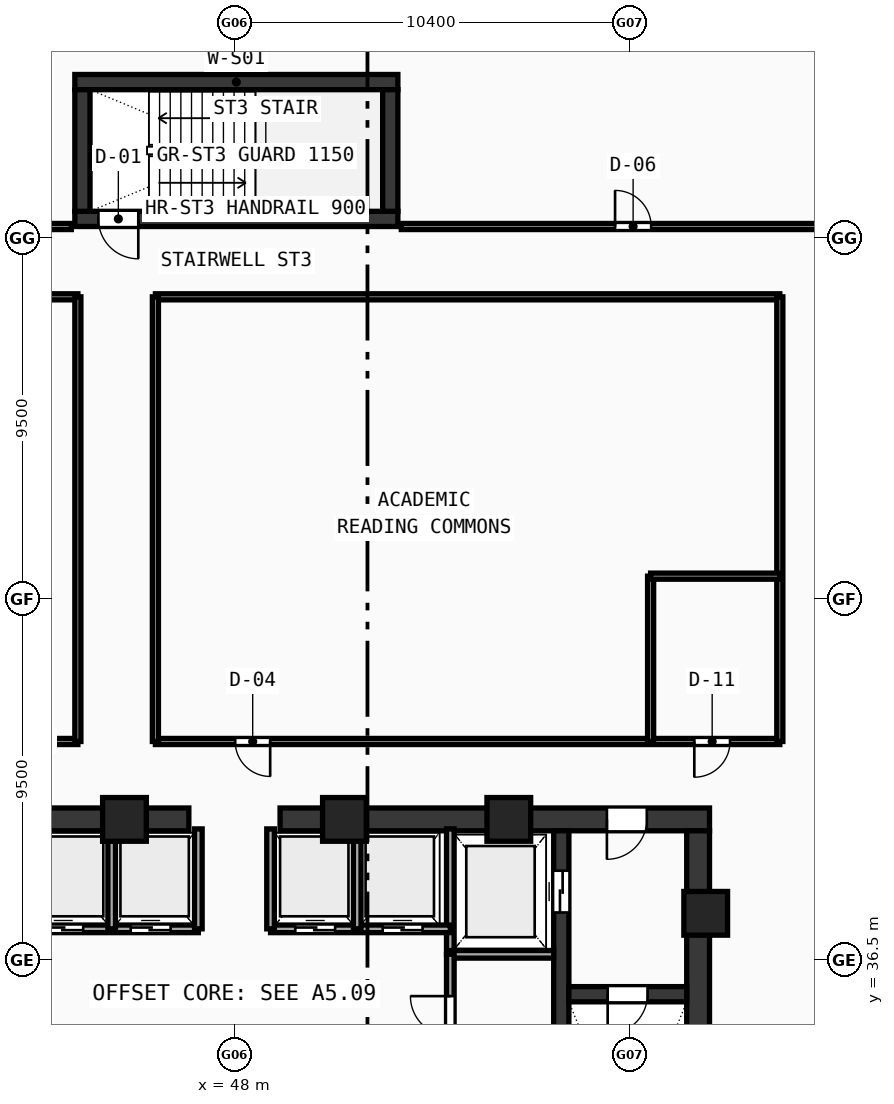
"""IFC4 building model, lengths in metres.
Left out: names, types, materials, properties, quantities, classifications, styles, units other than length and angle.
Written with IfcOpenShell. Run it as: python <this file> out.ifc"""

import sys

from ifc_helpers import new_model, si_unit, direction, frame, frame_2d, origin, origin_with_axes, origin_2d, place, context, subcontext, project, spatial, rectangle, hollow_rectangle, extrude, source, transform, mapped, element, fill, save


model = new_model("IFC4")
c1 = context("Model", 3, precision=1e-05, world=origin(), true_north=direction((0.0, 1.0)))
c2 = subcontext(c1, "Body", "Model", "MODEL_VIEW")
j1 = project(units=[si_unit("LENGTHUNIT", "METRE"), si_unit("PLANEANGLEUNIT", "RADIAN")], contexts=[c1])
p1 = place(None, origin())
s1 = spatial("IfcSite", under=j1, at=p1, CompositionType="ELEMENT")
p2 = place(p1, origin())
s2 = spatial("IfcBuilding", under=s1, at=p2, CompositionType="ELEMENT")
p3 = place(p2, frame((0.0, 0.0, 111.58)))
s3 = spatial("IfcBuildingStorey", under=s2, at=p3, CompositionType="ELEMENT", Elevation=111.58)
p4 = place(p3, frame((35.5, 40.2, 0.0), z_axis=(0.0, 0.0, 1.0), x_axis=(1.0, 0.0, 0.0)))
e1 = element("IfcWall", 1, at=p4, inside=s3, PredefinedType="SHEAR", context=c2, shape_type="SweptSolid", body=[
    extrude(rectangle(XDim=11.3, YDim=0.6, at=frame_2d((5.65, 0.0))), origin(), (0.0, 0.0, 1.0), 3.54),
])
p5 = place(p4, frame((1.65, 0.0, 0.0)))
e2 = element("IfcOpeningElement", 2, at=p5, cuts=e1, PredefinedType="OPENING", context=c2, shape_type="SweptSolid", body=[
    extrude(rectangle(XDim=1.05, YDim=2.1, at=frame_2d((0.525, 1.05))), frame((0.0, 0.31, 0.0), z_axis=(0.0, -1.0, 0.0), x_axis=(1.0, 0.0, 0.0)), (0.0, 0.0, 1.0), 0.62),
])
p6 = place(p3, frame((49.2, 40.2, 0.0), z_axis=(0.0, 0.0, 1.0), x_axis=(1.0, 0.0, 0.0)))
e3 = element("IfcWall", 3, at=p6, inside=s3, PredefinedType="SHEAR", context=c2, shape_type="SweptSolid", body=[
    extrude(rectangle(XDim=11.3, YDim=0.6, at=frame_2d((5.65, 0.0))), origin(), (0.0, 0.0, 1.0), 3.54),
])
p7 = place(p6, frame((8.6, 0.0, 0.0)))
e4 = element("IfcOpeningElement", 4, at=p7, cuts=e3, PredefinedType="OPENING", context=c2, shape_type="SweptSolid", body=[
    extrude(rectangle(XDim=1.05, YDim=2.1, at=frame_2d((0.525, 1.05))), frame((0.0, 0.31, 0.0), z_axis=(0.0, -1.0, 0.0), x_axis=(1.0, 0.0, 0.0)), (0.0, 0.0, 1.0), 0.62),
])
p8 = place(p3, frame((60.2, 27.8, 0.0), z_axis=(0.0, 0.0, 1.0), x_axis=(0.0, 1.0, 0.0)))
e5 = element("IfcWall", 5, at=p8, inside=s3, PredefinedType="SHEAR", context=c2, shape_type="SweptSolid", body=[
    extrude(rectangle(XDim=12.1, YDim=0.6, at=frame_2d((6.05, 0.0))), origin(), (0.0, 0.0, 1.0), 3.54),
])
p9 = place(p3, frame((56.6, 27.8, 0.0), z_axis=(0.0, 0.0, 1.0), x_axis=(0.0, 1.0, 0.0)))
e6 = element("IfcWall", 6, at=p9, inside=s3, PredefinedType="SHEAR", context=c2, shape_type="SweptSolid", body=[
    extrude(rectangle(XDim=12.1, YDim=0.4, at=frame_2d((6.05, 0.0))), origin(), (0.0, 0.0, 1.0), 3.54),
])
p10 = place(p9, frame((9.95, 0.0, 0.0)))
e7 = element("IfcOpeningElement", 7, at=p10, cuts=e6, PredefinedType="OPENING", context=c2, shape_type="SweptSolid", body=[
    extrude(rectangle(XDim=1.1, YDim=2.1, at=frame_2d((0.55, 1.05))), frame((0.0, 0.21, 0.0), z_axis=(0.0, -1.0, 0.0), x_axis=(1.0, 0.0, 0.0)), (0.0, 0.0, 1.0), 0.42),
])
p11 = place(p3, frame((56.8, 35.6, 0.0), z_axis=(0.0, 0.0, 1.0), x_axis=(1.0, 0.0, 0.0)))
e8 = element("IfcWall", 8, at=p11, inside=s3, PredefinedType="SHEAR", context=c2, shape_type="SweptSolid", body=[
    extrude(rectangle(XDim=3.1, YDim=0.4, at=frame_2d((1.55, 0.0))), origin(), (0.0, 0.0, 1.0), 3.54),
])
p12 = place(p11, frame((1.02, 0.0, 0.0)))
e9 = element("IfcOpeningElement", 9, at=p12, cuts=e8, PredefinedType="OPENING", context=c2, shape_type="SweptSolid", body=[
    extrude(rectangle(XDim=1.05, YDim=2.1, at=frame_2d((0.525, 1.05))), frame((0.0, 0.21, 0.0), z_axis=(0.0, -1.0, 0.0), x_axis=(1.0, 0.0, 0.0)), (0.0, 0.0, 1.0), 0.42),
])
p13 = place(p3, frame((43.8, 59.6, 0.0), z_axis=(0.0, 0.0, 1.0), x_axis=(1.0, 0.0, 0.0)))
e10 = element("IfcWall", 10, at=p13, inside=s3, PredefinedType="SHEAR", context=c2, shape_type="SweptSolid", body=[
    extrude(rectangle(XDim=8.5, YDim=0.4, at=frame_2d((4.25, 0.0))), origin(), (0.0, 0.0, 1.0), 3.54),
])
p14 = place(p3, frame((43.8, 56.0, 0.0), z_axis=(0.0, 0.0, 1.0), x_axis=(1.0, 0.0, 0.0)))
e11 = element("IfcWall", 11, at=p14, inside=s3, PredefinedType="SHEAR", context=c2, shape_type="SweptSolid", body=[
    extrude(rectangle(XDim=8.5, YDim=0.4, at=frame_2d((4.25, 0.0))), origin(), (0.0, 0.0, 1.0), 3.54),
])
p15 = place(p14, frame((0.62, 0.0, 0.0)))
e12 = element("IfcOpeningElement", 12, at=p15, cuts=e11, PredefinedType="OPENING", context=c2, shape_type="SweptSolid", body=[
    extrude(rectangle(XDim=1.05, YDim=2.1, at=frame_2d((0.525, 1.05))), frame((0.0, 0.21, 0.0), z_axis=(0.0, -1.0, 0.0), x_axis=(1.0, 0.0, 0.0)), (0.0, 0.0, 1.0), 0.42),
])
for number, where, z_axis, x_axis in (
    (13, (44.0, 56.2, 0.0), (0.0, 0.0, 1.0), (0.0, 1.0, 0.0)),
    (14, (52.1, 56.2, 0.0), (0.0, 0.0, 1.0), (0.0, 1.0, 0.0)),
):
    element("IfcWall", number, at=place(p3, frame(where, z_axis=z_axis, x_axis=x_axis)), inside=s3, PredefinedType="SHEAR", context=c2, shape_type="SweptSolid", body=[
        extrude(rectangle(XDim=3.2, YDim=0.4, at=frame_2d((1.6, 0.0))), origin(), (0.0, 0.0, 1.0), 3.54),
    ])
m1 = source(origin(), c2, "Body", "SweptSolid", [
    extrude(hollow_rectangle(XDim=1.15, YDim=1.15, WallThickness=0.048, at=origin_2d()), origin(), (0.0, 0.0, 1.0), 3.8),
])
for number, where, z_axis, x_axis in (
    (15, (60.4, 37.729, -0.26), (0.0, 0.0, 1.0), (1.0, 0.0, 0.0)),
    (16, (55.219, 40.2, -0.26), (0.0, 0.0, 1.0), (1.0, 0.0, 0.0)),
    (17, (50.894, 40.2, -0.26), (0.0, 0.0, 1.0), (1.0, 0.0, 0.0)),
    (18, (45.106, 40.2, -0.26), (0.0, 0.0, 1.0), (1.0, 0.0, 0.0)),
):
    element("IfcColumn", number, at=place(p3, frame(where, z_axis=z_axis, x_axis=x_axis)), inside=s3, PredefinedType="COLUMN", context=c2, shape_type="MappedRepresentation", body=[
        mapped(m1, transform((0.0, 0.0, 0.0), scale=1.0)),
    ])
p16 = place(p3, frame((53.68, 36.65, 0.0), z_axis=(0.0, 0.0, 1.0), x_axis=(0.0, 1.0, 0.0)))
e19 = element("IfcWall", 19, at=p16, inside=s3, PredefinedType="SOLIDWALL", context=c2, shape_type="SweptSolid", body=[
    extrude(rectangle(XDim=3.3, YDim=0.2, at=frame_2d((1.65, 0.0))), origin(), (0.0, 0.0, 1.0), 3.54),
])
p17 = place(p3, frame((53.68, 36.65, 0.0), z_axis=(0.0, 0.0, 1.0), x_axis=(1.0, 0.0, 0.0)))
e20 = element("IfcWall", 20, at=p17, inside=s3, PredefinedType="SOLIDWALL", context=c2, shape_type="SweptSolid", body=[
    extrude(rectangle(XDim=2.72, YDim=0.2, at=frame_2d((1.36, 0.0))), origin(), (0.0, 0.0, 1.0), 3.54),
])
p18 = place(p3, frame((42.32, 37.32, 0.0), z_axis=(0.0, 0.0, 1.0), x_axis=(1.0, 0.0, 0.0)))
e21 = element("IfcWall", 21, at=p18, inside=s3, PredefinedType="SOLIDWALL", context=c2, shape_type="SweptSolid", body=[
    extrude(rectangle(XDim=4.73, YDim=0.2, at=frame_2d((2.365, 0.0))), origin(), (0.0, 0.0, 1.0), 3.54),
])
p19 = place(p18, frame((0.65, 0.0, 0.0)))
e22 = element("IfcOpeningElement", 22, at=p19, cuts=e21, PredefinedType="OPENING", context=c2, shape_type="SweptSolid", body=[
    extrude(rectangle(XDim=1.05, YDim=2.1, at=frame_2d((0.525, 1.05))), frame((0.0, 0.11, 0.0), z_axis=(0.0, -1.0, 0.0), x_axis=(1.0, 0.0, 0.0)), (0.0, 0.0, 1.0), 0.22),
])
p20 = place(p18, frame((2.95, 0.0, 0.0)))
e23 = element("IfcOpeningElement", 23, at=p20, cuts=e21, PredefinedType="OPENING", context=c2, shape_type="SweptSolid", body=[
    extrude(rectangle(XDim=1.05, YDim=2.1, at=frame_2d((0.525, 1.05))), frame((0.0, 0.11, 0.0), z_axis=(0.0, -1.0, 0.0), x_axis=(1.0, 0.0, 0.0)), (0.0, 0.0, 1.0), 0.22),
])
p21 = place(p3, frame((48.95, 37.32, 0.0), z_axis=(0.0, 0.0, 1.0), x_axis=(1.0, 0.0, 0.0)))
e24 = element("IfcWall", 24, at=p21, inside=s3, PredefinedType="SOLIDWALL", context=c2, shape_type="SweptSolid", body=[
    extrude(rectangle(XDim=4.73, YDim=0.2, at=frame_2d((2.365, 0.0))), origin(), (0.0, 0.0, 1.0), 3.54),
])
p22 = place(p21, frame((0.65, 0.0, 0.0)))
e25 = element("IfcOpeningElement", 25, at=p22, cuts=e24, PredefinedType="OPENING", context=c2, shape_type="SweptSolid", body=[
    extrude(rectangle(XDim=1.05, YDim=2.1, at=frame_2d((0.525, 1.05))), frame((0.0, 0.11, 0.0), z_axis=(0.0, -1.0, 0.0), x_axis=(1.0, 0.0, 0.0)), (0.0, 0.0, 1.0), 0.22),
])
p23 = place(p21, frame((2.95, 0.0, 0.0)))
e26 = element("IfcOpeningElement", 26, at=p23, cuts=e24, PredefinedType="OPENING", context=c2, shape_type="SweptSolid", body=[
    extrude(rectangle(XDim=1.05, YDim=2.1, at=frame_2d((0.525, 1.05))), frame((0.0, 0.11, 0.0), z_axis=(0.0, -1.0, 0.0), x_axis=(1.0, 0.0, 0.0)), (0.0, 0.0, 1.0), 0.22),
])
for number, where, z_axis, x_axis in (
    (27, (47.05, 37.32, 0.0), (0.0, 0.0, 1.0), (0.0, 1.0, 0.0)),
    (28, (48.95, 37.32, 0.0), (0.0, 0.0, 1.0), (0.0, 1.0, 0.0)),
    (29, (44.77, 37.32, 0.0), (0.0, 0.0, 1.0), (0.0, 1.0, 0.0)),
    (30, (51.23, 37.32, 0.0), (0.0, 0.0, 1.0), (0.0, 1.0, 0.0)),
):
    element("IfcWall", number, at=place(p3, frame(where, z_axis=z_axis, x_axis=x_axis)), inside=s3, PredefinedType="SOLIDWALL", context=c2, shape_type="SweptSolid", body=[
        extrude(rectangle(XDim=2.63, YDim=0.2, at=frame_2d((1.315, 0.0))), origin(), (0.0, 0.0, 1.0), 3.54),
    ])
p24 = place(p3, frame((53.68, 27.6, 0.0), z_axis=(0.0, 0.0, 1.0), x_axis=(0.0, 1.0, 0.0)))
e31 = element("IfcWall", 31, at=p24, inside=s3, PredefinedType="SOLIDWALL", context=c2, shape_type="SweptSolid", body=[
    extrude(rectangle(XDim=9.05, YDim=0.2, at=frame_2d((4.525, 0.0))), origin(), (0.0, 0.0, 1.0), 3.54),
])
p25 = place(p24, frame((6.9, 0.0, 0.0)))
e32 = element("IfcOpeningElement", 32, at=p25, cuts=e31, PredefinedType="OPENING", context=c2, shape_type="SweptSolid", body=[
    extrude(rectangle(XDim=1.05, YDim=2.1, at=frame_2d((0.525, 1.05))), frame((0.0, 0.11, 0.0), z_axis=(0.0, -1.0, 0.0), x_axis=(1.0, 0.0, 0.0)), (0.0, 0.0, 1.0), 0.22),
])
p26 = place(p3, frame((34.3, 42.25, 0.0), z_axis=(0.0, 0.0, 1.0), x_axis=(1.0, 0.0, 0.0)))
e33 = element("IfcWall", 33, at=p26, inside=s3, PredefinedType="PARTITIONING", context=c2, shape_type="SweptSolid", body=[
    extrude(rectangle(XDim=9.58, YDim=0.16, at=frame_2d((4.79, 0.0))), origin(), (0.0, 0.0, 1.0), 2.84),
])
p27 = place(p26, frame((1.15, 0.0, 0.0)))
e34 = element("IfcOpeningElement", 34, at=p27, cuts=e33, PredefinedType="OPENING", context=c2, shape_type="SweptSolid", body=[
    extrude(rectangle(XDim=0.92, YDim=2.1, at=frame_2d((0.46, 1.05))), frame((0.0, 0.09, 0.0), z_axis=(0.0, -1.0, 0.0), x_axis=(1.0, 0.0, 0.0)), (0.0, 0.0, 1.0), 0.18),
])
p28 = place(p26, frame((4.65, 0.0, 0.0)))
e35 = element("IfcOpeningElement", 35, at=p28, cuts=e33, PredefinedType="OPENING", context=c2, shape_type="SweptSolid", body=[
    extrude(rectangle(XDim=0.92, YDim=2.1, at=frame_2d((0.46, 1.05))), frame((0.0, 0.09, 0.0), z_axis=(0.0, -1.0, 0.0), x_axis=(1.0, 0.0, 0.0)), (0.0, 0.0, 1.0), 0.18),
])
p29 = place(p3, frame((34.3, 53.95, 0.0), z_axis=(0.0, 0.0, 1.0), x_axis=(1.0, 0.0, 0.0)))
e36 = element("IfcWall", 36, at=p29, inside=s3, PredefinedType="PARTITIONING", context=c2, shape_type="SweptSolid", body=[
    extrude(rectangle(XDim=9.58, YDim=0.16, at=frame_2d((4.79, 0.0))), origin(), (0.0, 0.0, 1.0), 2.84),
])
p30 = place(p3, frame((43.88, 42.25, 0.0), z_axis=(0.0, 0.0, 1.0), x_axis=(0.0, 1.0, 0.0)))
e37 = element("IfcWall", 37, at=p30, inside=s3, PredefinedType="PARTITIONING", context=c2, shape_type="SweptSolid", body=[
    extrude(rectangle(XDim=11.7, YDim=0.16, at=frame_2d((5.85, 0.0))), origin(), (0.0, 0.0, 1.0), 2.84),
])
p31 = place(p3, frame((45.92, 42.25, 0.0), z_axis=(0.0, 0.0, 1.0), x_axis=(1.0, 0.0, 0.0)))
e38 = element("IfcWall", 38, at=p31, inside=s3, PredefinedType="PARTITIONING", context=c2, shape_type="SweptSolid", body=[
    extrude(rectangle(XDim=16.43, YDim=0.16, at=frame_2d((8.215, 0.0))), origin(), (0.0, 0.0, 1.0), 2.84),
])
p32 = place(p31, frame((2.1, 0.0, 0.0)))
e39 = element("IfcOpeningElement", 39, at=p32, cuts=e38, PredefinedType="OPENING", context=c2, shape_type="SweptSolid", body=[
    extrude(rectangle(XDim=0.92, YDim=2.1, at=frame_2d((0.46, 1.05))), frame((0.0, 0.09, 0.0), z_axis=(0.0, -1.0, 0.0), x_axis=(1.0, 0.0, 0.0)), (0.0, 0.0, 1.0), 0.18),
])
p33 = place(p31, frame((14.18, 0.0, 0.0)))
e40 = element("IfcOpeningElement", 40, at=p33, cuts=e38, PredefinedType="OPENING", context=c2, shape_type="SweptSolid", body=[
    extrude(rectangle(XDim=0.94, YDim=2.1, at=frame_2d((0.47, 1.05))), frame((0.0, 0.09, 0.0), z_axis=(0.0, -1.0, 0.0), x_axis=(1.0, 0.0, 0.0)), (0.0, 0.0, 1.0), 0.18),
])
p34 = place(p3, frame((45.92, 53.95, 0.0), z_axis=(0.0, 0.0, 1.0), x_axis=(1.0, 0.0, 0.0)))
e41 = element("IfcWall", 41, at=p34, inside=s3, PredefinedType="PARTITIONING", context=c2, shape_type="SweptSolid", body=[
    extrude(rectangle(XDim=16.43, YDim=0.16, at=frame_2d((8.215, 0.0))), origin(), (0.0, 0.0, 1.0), 2.84),
])
p35 = place(p3, frame((45.92, 42.25, 0.0), z_axis=(0.0, 0.0, 1.0), x_axis=(0.0, 1.0, 0.0)))
e42 = element("IfcWall", 42, at=p35, inside=s3, PredefinedType="PARTITIONING", context=c2, shape_type="SweptSolid", body=[
    extrude(rectangle(XDim=11.7, YDim=0.16, at=frame_2d((5.85, 0.0))), origin(), (0.0, 0.0, 1.0), 3.14),
])
p36 = place(p3, frame((62.35, 42.25, 0.0), z_axis=(0.0, 0.0, 1.0), x_axis=(0.0, 1.0, 0.0)))
e43 = element("IfcWall", 43, at=p36, inside=s3, PredefinedType="PARTITIONING", context=c2, shape_type="SweptSolid", body=[
    extrude(rectangle(XDim=11.7, YDim=0.16, at=frame_2d((5.85, 0.0))), origin(), (0.0, 0.0, 1.0), 2.84),
])
p37 = place(p3, frame((58.95, 42.25, 0.0), z_axis=(0.0, 0.0, 1.0), x_axis=(0.0, 1.0, 0.0)))
e44 = element("IfcWall", 44, at=p37, inside=s3, PredefinedType="PARTITIONING", context=c2, shape_type="SweptSolid", body=[
    extrude(rectangle(XDim=4.35, YDim=0.16, at=frame_2d((2.175, 0.0))), origin(), (0.0, 0.0, 1.0), 2.84),
])
p38 = place(p3, frame((58.95, 46.6, 0.0), z_axis=(0.0, 0.0, 1.0), x_axis=(1.0, 0.0, 0.0)))
e45 = element("IfcWall", 45, at=p38, inside=s3, PredefinedType="PARTITIONING", context=c2, shape_type="SweptSolid", body=[
    extrude(rectangle(XDim=3.4, YDim=0.16, at=frame_2d((1.7, 0.0))), origin(), (0.0, 0.0, 1.0), 2.84),
])
p39 = place(p3, frame((38.38, 55.8, 0.0), z_axis=(0.0, 0.0, 1.0), x_axis=(1.0, 0.0, 0.0)))
e46 = element("IfcWall", 46, at=p39, inside=s3, PredefinedType="PARTITIONING", context=c2, shape_type="SweptSolid", body=[
    extrude(rectangle(XDim=5.329, YDim=0.16, at=frame_2d((2.665, 0.0))), origin(), (0.0, 0.0, 1.0), 2.84),
])
p40 = place(p3, frame((52.391, 55.8, 0.0), z_axis=(0.0, 0.0, 1.0), x_axis=(1.0, 0.0, 0.0)))
e47 = element("IfcWall", 47, at=p40, inside=s3, PredefinedType="PARTITIONING", context=c2, shape_type="SweptSolid", body=[
    extrude(rectangle(XDim=11.809, YDim=0.16, at=frame_2d((5.904, 0.0))), origin(), (0.0, 0.0, 1.0), 2.84),
])
p41 = place(p40, frame((5.624, 0.0, 0.0)))
e48 = element("IfcOpeningElement", 48, at=p41, cuts=e47, PredefinedType="OPENING", context=c2, shape_type="SweptSolid", body=[
    extrude(rectangle(XDim=0.95, YDim=2.1, at=frame_2d((0.475, 1.05))), frame((0.0, 0.09, 0.0), z_axis=(0.0, -1.0, 0.0), x_axis=(1.0, 0.0, 0.0)), (0.0, 0.0, 1.0), 0.18),
])
m2 = source(origin(), c2, "Body", "SweptSolid", [
    extrude(rectangle(XDim=1.05, YDim=2.1, at=frame_2d((0.525, 1.05))), frame((0.0, 0.025, 0.0), z_axis=(0.0, -1.0, 0.0), x_axis=(1.0, 0.0, 0.0)), (0.0, 0.0, 1.0), 0.05),
])
p42 = place(p12, frame((1.05, 0.0, 0.0), z_axis=(0.0, 0.0, 1.0), x_axis=(-1.0, 0.0, 0.0)))
e49 = element("IfcDoor", 49, at=p42, inside=s3, OperationType="SINGLE_SWING_RIGHT", PredefinedType="DOOR", context=c2, shape_type="MappedRepresentation", body=[
    mapped(m2, transform((0.0, 0.0, 0.0), scale=1.0)),
])
fill(e9, e49)
p43 = place(p7, frame((1.05, 0.0, 0.0), z_axis=(0.0, 0.0, 1.0), x_axis=(-1.0, 0.0, 0.0)))
e50 = element("IfcDoor", 50, at=p43, inside=s3, OperationType="SINGLE_SWING_RIGHT", PredefinedType="DOOR", context=c2, shape_type="MappedRepresentation", body=[
    mapped(m2, transform((0.0, 0.0, 0.0), scale=1.0)),
])
fill(e4, e50)
m3 = source(origin(), c2, "Body", "SweptSolid", [
    extrude(rectangle(XDim=1.1, YDim=2.1, at=frame_2d((0.55, 1.05))), frame((0.0, 0.025, 0.0), z_axis=(0.0, -1.0, 0.0), x_axis=(1.0, 0.0, 0.0)), (0.0, 0.0, 1.0), 0.05),
])
p44 = place(p10, origin_with_axes())
e51 = element("IfcDoor", 51, at=p44, inside=s3, OperationType="DOUBLE_DOOR_SLIDING", PredefinedType="DOOR", context=c2, shape_type="MappedRepresentation", body=[
    mapped(m3, transform((0.0, 0.0, 0.0), scale=1.0)),
])
fill(e7, e51)
p45 = place(p19, frame((1.05, 0.0, 0.0), z_axis=(0.0, 0.0, 1.0), x_axis=(-1.0, 0.0, 0.0)))
e52 = element("IfcDoor", 52, at=p45, inside=s3, OperationType="DOUBLE_DOOR_SLIDING", PredefinedType="DOOR", context=c2, shape_type="MappedRepresentation", body=[
    mapped(m2, transform((0.0, 0.0, 0.0), scale=1.0)),
])
fill(e22, e52)
p46 = place(p20, frame((1.05, 0.0, 0.0), z_axis=(0.0, 0.0, 1.0), x_axis=(-1.0, 0.0, 0.0)))
e53 = element("IfcDoor", 53, at=p46, inside=s3, OperationType="DOUBLE_DOOR_SLIDING", PredefinedType="DOOR", context=c2, shape_type="MappedRepresentation", body=[
    mapped(m2, transform((0.0, 0.0, 0.0), scale=1.0)),
])
fill(e23, e53)
p47 = place(p22, frame((1.05, 0.0, 0.0), z_axis=(0.0, 0.0, 1.0), x_axis=(-1.0, 0.0, 0.0)))
e54 = element("IfcDoor", 54, at=p47, inside=s3, OperationType="DOUBLE_DOOR_SLIDING", PredefinedType="DOOR", context=c2, shape_type="MappedRepresentation", body=[
    mapped(m2, transform((0.0, 0.0, 0.0), scale=1.0)),
])
fill(e25, e54)
p48 = place(p23, frame((1.05, 0.0, 0.0), z_axis=(0.0, 0.0, 1.0), x_axis=(-1.0, 0.0, 0.0)))
e55 = element("IfcDoor", 55, at=p48, inside=s3, OperationType="DOUBLE_DOOR_SLIDING", PredefinedType="DOOR", context=c2, shape_type="MappedRepresentation", body=[
    mapped(m2, transform((0.0, 0.0, 0.0), scale=1.0)),
])
fill(e26, e55)
p49 = place(p25, origin_with_axes())
e56 = element("IfcDoor", 56, at=p49, inside=s3, OperationType="SINGLE_SWING_RIGHT", PredefinedType="DOOR", context=c2, shape_type="MappedRepresentation", body=[
    mapped(m2, transform((0.0, 0.0, 0.0), scale=1.0)),
])
fill(e32, e56)
p50 = place(p15, frame((1.05, 0.0, 0.0), z_axis=(0.0, 0.0, 1.0), x_axis=(-1.0, 0.0, 0.0)))
e57 = element("IfcDoor", 57, at=p50, inside=s3, OperationType="SINGLE_SWING_LEFT", PredefinedType="DOOR", context=c2, shape_type="MappedRepresentation", body=[
    mapped(m2, transform((0.0, 0.0, 0.0), scale=1.0)),
])
fill(e12, e57)
m4 = source(origin(), c2, "Body", "SweptSolid", [
    extrude(rectangle(XDim=0.92, YDim=2.1, at=frame_2d((0.46, 1.05))), frame((0.0, 0.025, 0.0), z_axis=(0.0, -1.0, 0.0), x_axis=(1.0, 0.0, 0.0)), (0.0, 0.0, 1.0), 0.05),
])
p51 = place(p32, frame((0.92, 0.0, 0.0), z_axis=(0.0, 0.0, 1.0), x_axis=(-1.0, 0.0, 0.0)))
e58 = element("IfcDoor", 58, at=p51, inside=s3, OperationType="SINGLE_SWING_LEFT", PredefinedType="DOOR", context=c2, shape_type="MappedRepresentation", body=[
    mapped(m4, transform((0.0, 0.0, 0.0), scale=1.0)),
])
fill(e39, e58)
m5 = source(origin(), c2, "Body", "SweptSolid", [
    extrude(rectangle(XDim=0.94, YDim=2.1, at=frame_2d((0.47, 1.05))), frame((0.0, 0.025, 0.0), z_axis=(0.0, -1.0, 0.0), x_axis=(1.0, 0.0, 0.0)), (0.0, 0.0, 1.0), 0.05),
])
p52 = place(p33, frame((0.94, 0.0, 0.0), z_axis=(0.0, 0.0, 1.0), x_axis=(-1.0, 0.0, 0.0)))
e59 = element("IfcDoor", 59, at=p52, inside=s3, OperationType="SINGLE_SWING_RIGHT", PredefinedType="DOOR", context=c2, shape_type="MappedRepresentation", body=[
    mapped(m5, transform((0.0, 0.0, 0.0), scale=1.0)),
])
fill(e40, e59)
m6 = source(origin(), c2, "Body", "SweptSolid", [
    extrude(rectangle(XDim=0.95, YDim=2.1, at=frame_2d((0.475, 1.05))), frame((0.0, 0.025, 0.0), z_axis=(0.0, -1.0, 0.0), x_axis=(1.0, 0.0, 0.0)), (0.0, 0.0, 1.0), 0.05),
])
p53 = place(p41, origin_with_axes())
e60 = element("IfcDoor", 60, at=p53, inside=s3, OperationType="SINGLE_SWING_LEFT", PredefinedType="DOOR", context=c2, shape_type="MappedRepresentation", body=[
    mapped(m6, transform((0.0, 0.0, 0.0), scale=1.0)),
])
fill(e48, e60)
save(model, sys.argv[1])
